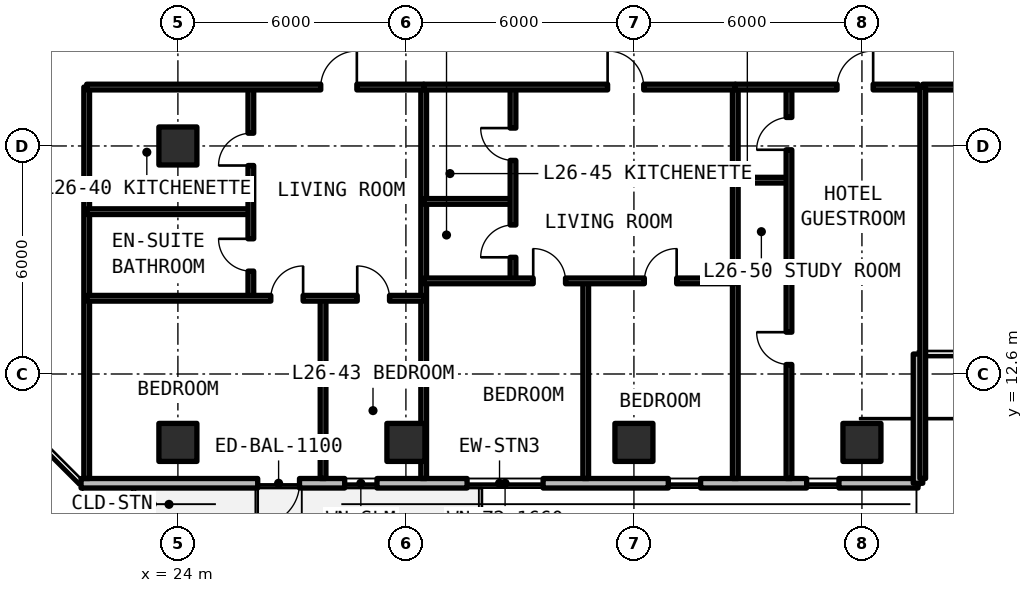
"""IFC4 building model, lengths in metres.
Left out: names, types, materials, properties, quantities, classifications, styles, units other than length and angle.
Written with IfcOpenShell. Run it as: python <this file> out.ifc"""

import sys

from ifc_helpers import new_model, si_unit, direction, frame, frame_2d, origin, origin_2d, place, context, subcontext, project, spatial, rectangle, extrude, element, fill, save


model = new_model("IFC4")
c1 = context("Model", 3, precision=1e-05, world=origin(), true_north=direction((0.0, 1.0)))
c2 = subcontext(c1, "Body", "Model", "MODEL_VIEW")
j1 = project(units=[si_unit("LENGTHUNIT", "METRE"), si_unit("PLANEANGLEUNIT", "RADIAN")], contexts=[c1])
p1 = place(None, origin())
s1 = spatial("IfcSite", under=j1, at=p1, CompositionType="ELEMENT")
p2 = place(p1, origin())
s2 = spatial("IfcBuilding", under=s1, at=p2, CompositionType="ELEMENT")
p3 = place(p2, frame((0.0, 0.0, 95.37)))
s3 = spatial("IfcBuildingStorey", under=s2, at=p3, CompositionType="ELEMENT", Elevation=95.37)
for number, where, z_axis, x_axis in (
    (1, (24.0, 18.6, 0.0), (0.0, 0.0, 1.0), (1.0, 0.0, 0.0)),
    (2, (24.0, 10.8, 0.0), (0.0, 0.0, 1.0), (1.0, 0.0, 0.0)),
    (3, (30.0, 10.8, 0.0), (0.0, 0.0, 1.0), (1.0, 0.0, 0.0)),
    (4, (36.0, 10.8, 0.0), (0.0, 0.0, 1.0), (1.0, 0.0, 0.0)),
    (5, (42.0, 10.8, 0.0), (0.0, 0.0, 1.0), (1.0, 0.0, 0.0)),
):
    element("IfcColumn", number, at=place(p3, frame(where, z_axis=z_axis, x_axis=x_axis)), inside=s3, PredefinedType="COLUMN", context=c2, shape_type="SweptSolid", body=[
        extrude(rectangle(XDim=1.0, YDim=1.0, at=origin_2d()), origin(), (0.0, 0.0, 1.0), 3.3),
    ])
p4 = place(p3, frame((21.452, 9.725, 0.0), z_axis=(0.0, 0.0, 1.0), x_axis=(1.0, 0.0, 0.0)))
e6 = element("IfcWall", 6, at=p4, inside=s3, PredefinedType="SOLIDWALL", context=c2, shape_type="SweptSolid", body=[
    extrude(rectangle(XDim=22.023, YDim=0.25, at=frame_2d((11.012, 0.0))), origin(), (0.0, 0.0, 1.0), 3.08),
])
p5 = place(p4, frame((4.648, 0.0, 0.0)))
e7 = element("IfcOpeningElement", 7, at=p5, cuts=e6, PredefinedType="OPENING", context=c2, shape_type="SweptSolid", body=[
    extrude(rectangle(XDim=1.1, YDim=2.15, at=frame_2d((0.55, 1.075))), frame((0.0, 0.135, 0.0), z_axis=(0.0, -1.0, 0.0), x_axis=(1.0, 0.0, 0.0)), (0.0, 0.0, 1.0), 0.27),
])
p6 = place(p4, frame((6.937, 0.0, 0.78)))
e8 = element("IfcOpeningElement", 8, at=p6, cuts=e6, PredefinedType="OPENING", context=c2, shape_type="SweptSolid", body=[
    extrude(rectangle(XDim=0.85, YDim=1.65, at=frame_2d((0.425, 0.825))), frame((0.0, 0.135, 0.0), z_axis=(0.0, -1.0, 0.0), x_axis=(1.0, 0.0, 0.0)), (0.0, 0.0, 1.0), 0.27),
])
p7 = place(p4, frame((10.158, 0.0, 0.78)))
e9 = element("IfcOpeningElement", 9, at=p7, cuts=e6, PredefinedType="OPENING", context=c2, shape_type="SweptSolid", body=[
    extrude(rectangle(XDim=2.0, YDim=1.66, at=frame_2d((1.0, 0.83))), frame((0.0, 0.135, 0.0), z_axis=(0.0, -1.0, 0.0), x_axis=(1.0, 0.0, 0.0)), (0.0, 0.0, 1.0), 0.27),
])
p8 = place(p4, frame((15.453, 0.0, 0.78)))
e10 = element("IfcOpeningElement", 10, at=p8, cuts=e6, PredefinedType="OPENING", context=c2, shape_type="SweptSolid", body=[
    extrude(rectangle(XDim=0.85, YDim=1.65, at=frame_2d((0.425, 0.825))), frame((0.0, 0.135, 0.0), z_axis=(0.0, -1.0, 0.0), x_axis=(1.0, 0.0, 0.0)), (0.0, 0.0, 1.0), 0.27),
])
p9 = place(p4, frame((19.093, 0.0, 0.78)))
e11 = element("IfcOpeningElement", 11, at=p9, cuts=e6, PredefinedType="OPENING", context=c2, shape_type="SweptSolid", body=[
    extrude(rectangle(XDim=0.85, YDim=1.65, at=frame_2d((0.425, 0.825))), frame((0.0, 0.135, 0.0), z_axis=(0.0, -1.0, 0.0), x_axis=(1.0, 0.0, 0.0)), (0.0, 0.0, 1.0), 0.27),
])
p10 = place(p3, frame((43.475, 9.725, 0.0), z_axis=(0.0, 0.0, 1.0), x_axis=(0.0, 1.0, 0.0)))
e12 = element("IfcWall", 12, at=p10, inside=s3, PredefinedType="SOLIDWALL", context=c2, shape_type="SweptSolid", body=[
    extrude(rectangle(XDim=3.4, YDim=0.25, at=frame_2d((1.7, 0.0))), origin(), (0.0, 0.0, 1.0), 3.08),
])
p11 = place(p3, frame((43.6, 20.15, 0.0), z_axis=(0.0, 0.0, 1.0), x_axis=(1.0, 0.0, 0.0)))
e13 = element("IfcWall", 13, at=p11, inside=s3, PredefinedType="SOLIDWALL", context=c2, shape_type="SweptSolid", body=[
    extrude(rectangle(XDim=8.4, YDim=0.15, at=frame_2d((4.2, 0.0))), origin(), (0.0, 0.0, 1.0), 2.35),
])
p12 = place(p11, frame((3.65, 0.0, 0.0)))
e14 = element("IfcOpeningElement", 14, at=p12, cuts=e13, PredefinedType="OPENING", context=c2, shape_type="SweptSolid", body=[
    extrude(rectangle(XDim=1.1, YDim=2.15, at=frame_2d((0.55, 1.075))), frame((0.0, 0.085, 0.0), z_axis=(0.0, -1.0, 0.0), x_axis=(1.0, 0.0, 0.0)), (0.0, 0.0, 1.0), 0.17),
])
for number, where, z_axis, x_axis in (
    (15, (43.6, 9.85, 0.0), (0.0, 0.0, 1.0), (0.0, 1.0, 0.0)),
    (16, (21.6, 9.85, 0.0), (0.0, 0.0, 1.0), (0.0, 1.0, 0.0)),
    (17, (30.468, 9.85, 0.0), (0.0, 0.0, 1.0), (0.0, 1.0, 0.0)),
):
    element("IfcWall", number, at=place(p3, frame(where, z_axis=z_axis, x_axis=x_axis)), inside=s3, PredefinedType="SOLIDWALL", context=c2, shape_type="SweptSolid", body=[
        extrude(rectangle(XDim=10.3, YDim=0.15, at=frame_2d((5.15, 0.0))), origin(), (0.0, 0.0, 1.0), 2.35),
    ])
p13 = place(p3, frame((21.6, 16.871, 0.0), z_axis=(0.0, 0.0, 1.0), x_axis=(1.0, 0.0, 0.0)))
e18 = element("IfcWall", 18, at=p13, inside=s3, PredefinedType="PARTITIONING", context=c2, shape_type="SweptSolid", body=[
    extrude(rectangle(XDim=4.32, YDim=0.15, at=frame_2d((2.16, 0.0))), origin(), (0.0, 0.0, 1.0), 2.35),
])
p14 = place(p3, frame((25.92, 14.593, 0.0), z_axis=(0.0, 0.0, 1.0), x_axis=(0.0, 1.0, 0.0)))
e19 = element("IfcWall", 19, at=p14, inside=s3, PredefinedType="PARTITIONING", context=c2, shape_type="SweptSolid", body=[
    extrude(rectangle(XDim=5.557, YDim=0.15, at=frame_2d((2.779, 0.0))), origin(), (0.0, 0.0, 1.0), 2.35),
])
p15 = place(p14, frame((0.714, 0.0, 0.0)))
e20 = element("IfcOpeningElement", 20, at=p15, cuts=e19, PredefinedType="OPENING", context=c2, shape_type="SweptSolid", body=[
    extrude(rectangle(XDim=0.85, YDim=2.1, at=frame_2d((0.425, 1.05))), frame((0.0, 0.085, 0.0), z_axis=(0.0, -1.0, 0.0), x_axis=(1.0, 0.0, 0.0)), (0.0, 0.0, 1.0), 0.17),
])
p16 = place(p14, frame((3.493, 0.0, 0.0)))
e21 = element("IfcOpeningElement", 21, at=p16, cuts=e19, PredefinedType="OPENING", context=c2, shape_type="SweptSolid", body=[
    extrude(rectangle(XDim=0.85, YDim=2.1, at=frame_2d((0.425, 1.05))), frame((0.0, 0.085, 0.0), z_axis=(0.0, -1.0, 0.0), x_axis=(1.0, 0.0, 0.0)), (0.0, 0.0, 1.0), 0.17),
])
p17 = place(p3, frame((27.82, 9.85, 0.0), z_axis=(0.0, 0.0, 1.0), x_axis=(0.0, 1.0, 0.0)))
e22 = element("IfcWall", 22, at=p17, inside=s3, PredefinedType="PARTITIONING", context=c2, shape_type="SweptSolid", body=[
    extrude(rectangle(XDim=4.743, YDim=0.15, at=frame_2d((2.371, 0.0))), origin(), (0.0, 0.0, 1.0), 2.35),
])
p18 = place(p3, frame((21.6, 14.593, 0.0), z_axis=(0.0, 0.0, 1.0), x_axis=(1.0, 0.0, 0.0)))
e23 = element("IfcWall", 23, at=p18, inside=s3, PredefinedType="PARTITIONING", context=c2, shape_type="SweptSolid", body=[
    extrude(rectangle(XDim=8.868, YDim=0.15, at=frame_2d((4.434, 0.0))), origin(), (0.0, 0.0, 1.0), 2.35),
])
p19 = place(p18, frame((4.845, 0.0, 0.0)))
e24 = element("IfcOpeningElement", 24, at=p19, cuts=e23, PredefinedType="OPENING", context=c2, shape_type="SweptSolid", body=[
    extrude(rectangle(XDim=0.85, YDim=2.1, at=frame_2d((0.425, 1.05))), frame((0.0, 0.085, 0.0), z_axis=(0.0, -1.0, 0.0), x_axis=(1.0, 0.0, 0.0)), (0.0, 0.0, 1.0), 0.17),
])
p20 = place(p18, frame((7.119, 0.0, 0.0)))
e25 = element("IfcOpeningElement", 25, at=p20, cuts=e23, PredefinedType="OPENING", context=c2, shape_type="SweptSolid", body=[
    extrude(rectangle(XDim=0.85, YDim=2.1, at=frame_2d((0.425, 1.05))), frame((0.0, 0.085, 0.0), z_axis=(0.0, -1.0, 0.0), x_axis=(1.0, 0.0, 0.0)), (0.0, 0.0, 1.0), 0.17),
])
p21 = place(p3, frame((21.6, 20.15, 0.0), z_axis=(0.0, 0.0, 1.0), x_axis=(1.0, 0.0, 0.0)))
e26 = element("IfcWall", 26, at=p21, inside=s3, PredefinedType="SOLIDWALL", context=c2, shape_type="SweptSolid", body=[
    extrude(rectangle(XDim=8.868, YDim=0.15, at=frame_2d((4.434, 0.0))), origin(), (0.0, 0.0, 1.0), 2.35),
])
p22 = place(p21, frame((6.159, 0.0, 0.0)))
e27 = element("IfcOpeningElement", 27, at=p22, cuts=e26, PredefinedType="OPENING", context=c2, shape_type="SweptSolid", body=[
    extrude(rectangle(XDim=0.95, YDim=2.15, at=frame_2d((0.475, 1.075))), frame((0.0, 0.085, 0.0), z_axis=(0.0, -1.0, 0.0), x_axis=(1.0, 0.0, 0.0)), (0.0, 0.0, 1.0), 0.17),
])
p23 = place(p3, frame((38.667, 9.85, 0.0), z_axis=(0.0, 0.0, 1.0), x_axis=(0.0, 1.0, 0.0)))
e28 = element("IfcWall", 28, at=p23, inside=s3, PredefinedType="SOLIDWALL", context=c2, shape_type="SweptSolid", body=[
    extrude(rectangle(XDim=10.3, YDim=0.15, at=frame_2d((5.15, 0.0))), origin(), (0.0, 0.0, 1.0), 2.35),
])
p24 = place(p3, frame((30.468, 17.141, 0.0), z_axis=(0.0, 0.0, 1.0), x_axis=(1.0, 0.0, 0.0)))
e29 = element("IfcWall", 29, at=p24, inside=s3, PredefinedType="PARTITIONING", context=c2, shape_type="SweptSolid", body=[
    extrude(rectangle(XDim=2.35, YDim=0.15, at=frame_2d((1.175, 0.0))), origin(), (0.0, 0.0, 1.0), 2.35),
])
p25 = place(p3, frame((32.818, 15.05, 0.0), z_axis=(0.0, 0.0, 1.0), x_axis=(0.0, 1.0, 0.0)))
e30 = element("IfcWall", 30, at=p25, inside=s3, PredefinedType="PARTITIONING", context=c2, shape_type="SweptSolid", body=[
    extrude(rectangle(XDim=5.1, YDim=0.15, at=frame_2d((2.55, 0.0))), origin(), (0.0, 0.0, 1.0), 2.35),
])
p26 = place(p25, frame((0.621, 0.0, 0.0)))
e31 = element("IfcOpeningElement", 31, at=p26, cuts=e30, PredefinedType="OPENING", context=c2, shape_type="SweptSolid", body=[
    extrude(rectangle(XDim=0.85, YDim=2.1, at=frame_2d((0.425, 1.05))), frame((0.0, 0.085, 0.0), z_axis=(0.0, -1.0, 0.0), x_axis=(1.0, 0.0, 0.0)), (0.0, 0.0, 1.0), 0.17),
])
p27 = place(p25, frame((3.17, 0.0, 0.0)))
e32 = element("IfcOpeningElement", 32, at=p27, cuts=e30, PredefinedType="OPENING", context=c2, shape_type="SweptSolid", body=[
    extrude(rectangle(XDim=0.85, YDim=2.1, at=frame_2d((0.425, 1.05))), frame((0.0, 0.085, 0.0), z_axis=(0.0, -1.0, 0.0), x_axis=(1.0, 0.0, 0.0)), (0.0, 0.0, 1.0), 0.17),
])
p28 = place(p3, frame((34.732, 9.85, 0.0), z_axis=(0.0, 0.0, 1.0), x_axis=(0.0, 1.0, 0.0)))
e33 = element("IfcWall", 33, at=p28, inside=s3, PredefinedType="PARTITIONING", context=c2, shape_type="SweptSolid", body=[
    extrude(rectangle(XDim=5.2, YDim=0.15, at=frame_2d((2.6, 0.0))), origin(), (0.0, 0.0, 1.0), 2.35),
])
p29 = place(p3, frame((30.468, 15.05, 0.0), z_axis=(0.0, 0.0, 1.0), x_axis=(1.0, 0.0, 0.0)))
e34 = element("IfcWall", 34, at=p29, inside=s3, PredefinedType="PARTITIONING", context=c2, shape_type="SweptSolid", body=[
    extrude(rectangle(XDim=8.199, YDim=0.15, at=frame_2d((4.1, 0.0))), origin(), (0.0, 0.0, 1.0), 2.35),
])
p30 = place(p29, frame((2.882, 0.0, 0.0)))
e35 = element("IfcOpeningElement", 35, at=p30, cuts=e34, PredefinedType="OPENING", context=c2, shape_type="SweptSolid", body=[
    extrude(rectangle(XDim=0.85, YDim=2.1, at=frame_2d((0.425, 1.05))), frame((0.0, 0.085, 0.0), z_axis=(0.0, -1.0, 0.0), x_axis=(1.0, 0.0, 0.0)), (0.0, 0.0, 1.0), 0.17),
])
p31 = place(p29, frame((5.806, 0.0, 0.0)))
e36 = element("IfcOpeningElement", 36, at=p31, cuts=e34, PredefinedType="OPENING", context=c2, shape_type="SweptSolid", body=[
    extrude(rectangle(XDim=0.85, YDim=2.1, at=frame_2d((0.425, 1.05))), frame((0.0, 0.085, 0.0), z_axis=(0.0, -1.0, 0.0), x_axis=(1.0, 0.0, 0.0)), (0.0, 0.0, 1.0), 0.17),
])
p32 = place(p3, frame((30.468, 20.15, 0.0), z_axis=(0.0, 0.0, 1.0), x_axis=(1.0, 0.0, 0.0)))
e37 = element("IfcWall", 37, at=p32, inside=s3, PredefinedType="SOLIDWALL", context=c2, shape_type="SweptSolid", body=[
    extrude(rectangle(XDim=8.199, YDim=0.15, at=frame_2d((4.1, 0.0))), origin(), (0.0, 0.0, 1.0), 2.35),
])
p33 = place(p32, frame((4.84, 0.0, 0.0)))
e38 = element("IfcOpeningElement", 38, at=p33, cuts=e37, PredefinedType="OPENING", context=c2, shape_type="SweptSolid", body=[
    extrude(rectangle(XDim=0.95, YDim=2.15, at=frame_2d((0.475, 1.075))), frame((0.0, 0.085, 0.0), z_axis=(0.0, -1.0, 0.0), x_axis=(1.0, 0.0, 0.0)), (0.0, 0.0, 1.0), 0.17),
])
p34 = place(p3, frame((38.667, 17.7, 0.0), z_axis=(0.0, 0.0, 1.0), x_axis=(1.0, 0.0, 0.0)))
e39 = element("IfcWall", 39, at=p34, inside=s3, PredefinedType="PARTITIONING", context=c2, shape_type="SweptSolid", body=[
    extrude(rectangle(XDim=1.413, YDim=0.15, at=frame_2d((0.707, 0.0))), origin(), (0.0, 0.0, 1.0), 2.35),
])
p35 = place(p3, frame((40.08, 9.85, 0.0), z_axis=(0.0, 0.0, 1.0), x_axis=(0.0, 1.0, 0.0)))
e40 = element("IfcWall", 40, at=p35, inside=s3, PredefinedType="PARTITIONING", context=c2, shape_type="SweptSolid", body=[
    extrude(rectangle(XDim=10.3, YDim=0.15, at=frame_2d((5.15, 0.0))), origin(), (0.0, 0.0, 1.0), 2.35),
])
p36 = place(p35, frame((3.0, 0.0, 0.0)))
e41 = element("IfcOpeningElement", 41, at=p36, cuts=e40, PredefinedType="OPENING", context=c2, shape_type="SweptSolid", body=[
    extrude(rectangle(XDim=0.85, YDim=2.1, at=frame_2d((0.425, 1.05))), frame((0.0, 0.085, 0.0), z_axis=(0.0, -1.0, 0.0), x_axis=(1.0, 0.0, 0.0)), (0.0, 0.0, 1.0), 0.17),
])
p37 = place(p35, frame((8.65, 0.0, 0.0)))
e42 = element("IfcOpeningElement", 42, at=p37, cuts=e40, PredefinedType="OPENING", context=c2, shape_type="SweptSolid", body=[
    extrude(rectangle(XDim=0.85, YDim=2.1, at=frame_2d((0.425, 1.05))), frame((0.0, 0.085, 0.0), z_axis=(0.0, -1.0, 0.0), x_axis=(1.0, 0.0, 0.0)), (0.0, 0.0, 1.0), 0.17),
])
p38 = place(p3, frame((38.667, 20.15, 0.0), z_axis=(0.0, 0.0, 1.0), x_axis=(1.0, 0.0, 0.0)))
e43 = element("IfcWall", 43, at=p38, inside=s3, PredefinedType="SOLIDWALL", context=c2, shape_type="SweptSolid", body=[
    extrude(rectangle(XDim=4.813, YDim=0.15, at=frame_2d((2.406, 0.0))), origin(), (0.0, 0.0, 1.0), 2.35),
])
p39 = place(p38, frame((2.678, 0.0, 0.0)))
e44 = element("IfcOpeningElement", 44, at=p39, cuts=e43, PredefinedType="OPENING", context=c2, shape_type="SweptSolid", body=[
    extrude(rectangle(XDim=0.95, YDim=2.15, at=frame_2d((0.475, 1.075))), frame((0.0, 0.085, 0.0), z_axis=(0.0, -1.0, 0.0), x_axis=(1.0, 0.0, 0.0)), (0.0, 0.0, 1.0), 0.17),
])
p40 = place(p5, frame((1.1, 0.0, 0.0), z_axis=(0.0, 0.0, 1.0), x_axis=(-1.0, 0.0, 0.0)))
e45 = element("IfcDoor", 45, at=p40, inside=s3, OperationType="SINGLE_SWING_RIGHT", PredefinedType="DOOR", context=c2, shape_type="SweptSolid", body=[
    extrude(rectangle(XDim=1.1, YDim=2.15, at=frame_2d((0.55, 1.075))), frame((0.0, 0.025, 0.0), z_axis=(0.0, -1.0, 0.0), x_axis=(1.0, 0.0, 0.0)), (0.0, 0.0, 1.0), 0.05),
])
fill(e7, e45)
p41 = place(p6, origin())
e46 = element("IfcWindow", 46, at=p41, inside=s3, PartitioningType="SINGLE_PANEL", PredefinedType="WINDOW", context=c2, shape_type="SweptSolid", body=[
    extrude(rectangle(XDim=0.85, YDim=1.65, at=frame_2d((0.425, 0.825))), frame((0.0, 0.03, 0.0), z_axis=(0.0, -1.0, 0.0), x_axis=(1.0, 0.0, 0.0)), (0.0, 0.0, 1.0), 0.06),
])
fill(e8, e46)
p42 = place(p7, origin())
e47 = element("IfcWindow", 47, at=p42, inside=s3, PartitioningType="SINGLE_PANEL", PredefinedType="WINDOW", context=c2, shape_type="SweptSolid", body=[
    extrude(rectangle(XDim=2.0, YDim=1.66, at=frame_2d((1.0, 0.83))), frame((0.0, 0.03, 0.0), z_axis=(0.0, -1.0, 0.0), x_axis=(1.0, 0.0, 0.0)), (0.0, 0.0, 1.0), 0.06),
])
fill(e9, e47)
p43 = place(p8, origin())
e48 = element("IfcWindow", 48, at=p43, inside=s3, PartitioningType="SINGLE_PANEL", PredefinedType="WINDOW", context=c2, shape_type="SweptSolid", body=[
    extrude(rectangle(XDim=0.85, YDim=1.65, at=frame_2d((0.425, 0.825))), frame((0.0, 0.03, 0.0), z_axis=(0.0, -1.0, 0.0), x_axis=(1.0, 0.0, 0.0)), (0.0, 0.0, 1.0), 0.06),
])
fill(e10, e48)
p44 = place(p9, origin())
e49 = element("IfcWindow", 49, at=p44, inside=s3, PartitioningType="SINGLE_PANEL", PredefinedType="WINDOW", context=c2, shape_type="SweptSolid", body=[
    extrude(rectangle(XDim=0.85, YDim=1.65, at=frame_2d((0.425, 0.825))), frame((0.0, 0.03, 0.0), z_axis=(0.0, -1.0, 0.0), x_axis=(1.0, 0.0, 0.0)), (0.0, 0.0, 1.0), 0.06),
])
fill(e11, e49)
p45 = place(p15, origin())
e50 = element("IfcDoor", 50, at=p45, inside=s3, OperationType="SINGLE_SWING_RIGHT", PredefinedType="DOOR", context=c2, shape_type="SweptSolid", body=[
    extrude(rectangle(XDim=0.85, YDim=2.1, at=frame_2d((0.425, 1.05))), frame((0.0, 0.025, 0.0), z_axis=(0.0, -1.0, 0.0), x_axis=(1.0, 0.0, 0.0)), (0.0, 0.0, 1.0), 0.05),
])
fill(e20, e50)
p46 = place(p16, origin())
e51 = element("IfcDoor", 51, at=p46, inside=s3, OperationType="SINGLE_SWING_LEFT", PredefinedType="DOOR", context=c2, shape_type="SweptSolid", body=[
    extrude(rectangle(XDim=0.85, YDim=2.1, at=frame_2d((0.425, 1.05))), frame((0.0, 0.025, 0.0), z_axis=(0.0, -1.0, 0.0), x_axis=(1.0, 0.0, 0.0)), (0.0, 0.0, 1.0), 0.05),
])
fill(e21, e51)
p47 = place(p19, origin())
e52 = element("IfcDoor", 52, at=p47, inside=s3, OperationType="SINGLE_SWING_RIGHT", PredefinedType="DOOR", context=c2, shape_type="SweptSolid", body=[
    extrude(rectangle(XDim=0.85, YDim=2.1, at=frame_2d((0.425, 1.05))), frame((0.0, 0.025, 0.0), z_axis=(0.0, -1.0, 0.0), x_axis=(1.0, 0.0, 0.0)), (0.0, 0.0, 1.0), 0.05),
])
fill(e24, e52)
p48 = place(p20, origin())
e53 = element("IfcDoor", 53, at=p48, inside=s3, OperationType="SINGLE_SWING_LEFT", PredefinedType="DOOR", context=c2, shape_type="SweptSolid", body=[
    extrude(rectangle(XDim=0.85, YDim=2.1, at=frame_2d((0.425, 1.05))), frame((0.0, 0.025, 0.0), z_axis=(0.0, -1.0, 0.0), x_axis=(1.0, 0.0, 0.0)), (0.0, 0.0, 1.0), 0.05),
])
fill(e25, e53)
p49 = place(p22, origin())
e54 = element("IfcDoor", 54, at=p49, inside=s3, OperationType="SINGLE_SWING_RIGHT", PredefinedType="DOOR", context=c2, shape_type="SweptSolid", body=[
    extrude(rectangle(XDim=0.95, YDim=2.15, at=frame_2d((0.475, 1.075))), frame((0.0, 0.025, 0.0), z_axis=(0.0, -1.0, 0.0), x_axis=(1.0, 0.0, 0.0)), (0.0, 0.0, 1.0), 0.05),
])
fill(e27, e54)
p50 = place(p26, origin())
e55 = element("IfcDoor", 55, at=p50, inside=s3, OperationType="SINGLE_SWING_LEFT", PredefinedType="DOOR", context=c2, shape_type="SweptSolid", body=[
    extrude(rectangle(XDim=0.85, YDim=2.1, at=frame_2d((0.425, 1.05))), frame((0.0, 0.025, 0.0), z_axis=(0.0, -1.0, 0.0), x_axis=(1.0, 0.0, 0.0)), (0.0, 0.0, 1.0), 0.05),
])
fill(e31, e55)
p51 = place(p27, origin())
e56 = element("IfcDoor", 56, at=p51, inside=s3, OperationType="SINGLE_SWING_RIGHT", PredefinedType="DOOR", context=c2, shape_type="SweptSolid", body=[
    extrude(rectangle(XDim=0.85, YDim=2.1, at=frame_2d((0.425, 1.05))), frame((0.0, 0.025, 0.0), z_axis=(0.0, -1.0, 0.0), x_axis=(1.0, 0.0, 0.0)), (0.0, 0.0, 1.0), 0.05),
])
fill(e32, e56)
p52 = place(p30, origin())
e57 = element("IfcDoor", 57, at=p52, inside=s3, OperationType="SINGLE_SWING_LEFT", PredefinedType="DOOR", context=c2, shape_type="SweptSolid", body=[
    extrude(rectangle(XDim=0.85, YDim=2.1, at=frame_2d((0.425, 1.05))), frame((0.0, 0.025, 0.0), z_axis=(0.0, -1.0, 0.0), x_axis=(1.0, 0.0, 0.0)), (0.0, 0.0, 1.0), 0.05),
])
fill(e35, e57)
p53 = place(p31, origin())
e58 = element("IfcDoor", 58, at=p53, inside=s3, OperationType="SINGLE_SWING_RIGHT", PredefinedType="DOOR", context=c2, shape_type="SweptSolid", body=[
    extrude(rectangle(XDim=0.85, YDim=2.1, at=frame_2d((0.425, 1.05))), frame((0.0, 0.025, 0.0), z_axis=(0.0, -1.0, 0.0), x_axis=(1.0, 0.0, 0.0)), (0.0, 0.0, 1.0), 0.05),
])
fill(e36, e58)
p54 = place(p33, origin())
e59 = element("IfcDoor", 59, at=p54, inside=s3, OperationType="SINGLE_SWING_LEFT", PredefinedType="DOOR", context=c2, shape_type="SweptSolid", body=[
    extrude(rectangle(XDim=0.95, YDim=2.15, at=frame_2d((0.475, 1.075))), frame((0.0, 0.025, 0.0), z_axis=(0.0, -1.0, 0.0), x_axis=(1.0, 0.0, 0.0)), (0.0, 0.0, 1.0), 0.05),
])
fill(e38, e59)
p55 = place(p36, origin())
e60 = element("IfcDoor", 60, at=p55, inside=s3, OperationType="SINGLE_SWING_RIGHT", PredefinedType="DOOR", context=c2, shape_type="SweptSolid", body=[
    extrude(rectangle(XDim=0.85, YDim=2.1, at=frame_2d((0.425, 1.05))), frame((0.0, 0.025, 0.0), z_axis=(0.0, -1.0, 0.0), x_axis=(1.0, 0.0, 0.0)), (0.0, 0.0, 1.0), 0.05),
])
fill(e41, e60)
p56 = place(p37, origin())
e61 = element("IfcDoor", 61, at=p56, inside=s3, OperationType="SINGLE_SWING_LEFT", PredefinedType="DOOR", context=c2, shape_type="SweptSolid", body=[
    extrude(rectangle(XDim=0.85, YDim=2.1, at=frame_2d((0.425, 1.05))), frame((0.0, 0.025, 0.0), z_axis=(0.0, -1.0, 0.0), x_axis=(1.0, 0.0, 0.0)), (0.0, 0.0, 1.0), 0.05),
])
fill(e42, e61)
p57 = place(p39, origin())
e62 = element("IfcDoor", 62, at=p57, inside=s3, OperationType="SINGLE_SWING_RIGHT", PredefinedType="DOOR", context=c2, shape_type="SweptSolid", body=[
    extrude(rectangle(XDim=0.95, YDim=2.15, at=frame_2d((0.475, 1.075))), frame((0.0, 0.025, 0.0), z_axis=(0.0, -1.0, 0.0), x_axis=(1.0, 0.0, 0.0)), (0.0, 0.0, 1.0), 0.05),
])
fill(e44, e62)
save(model, sys.argv[1])
